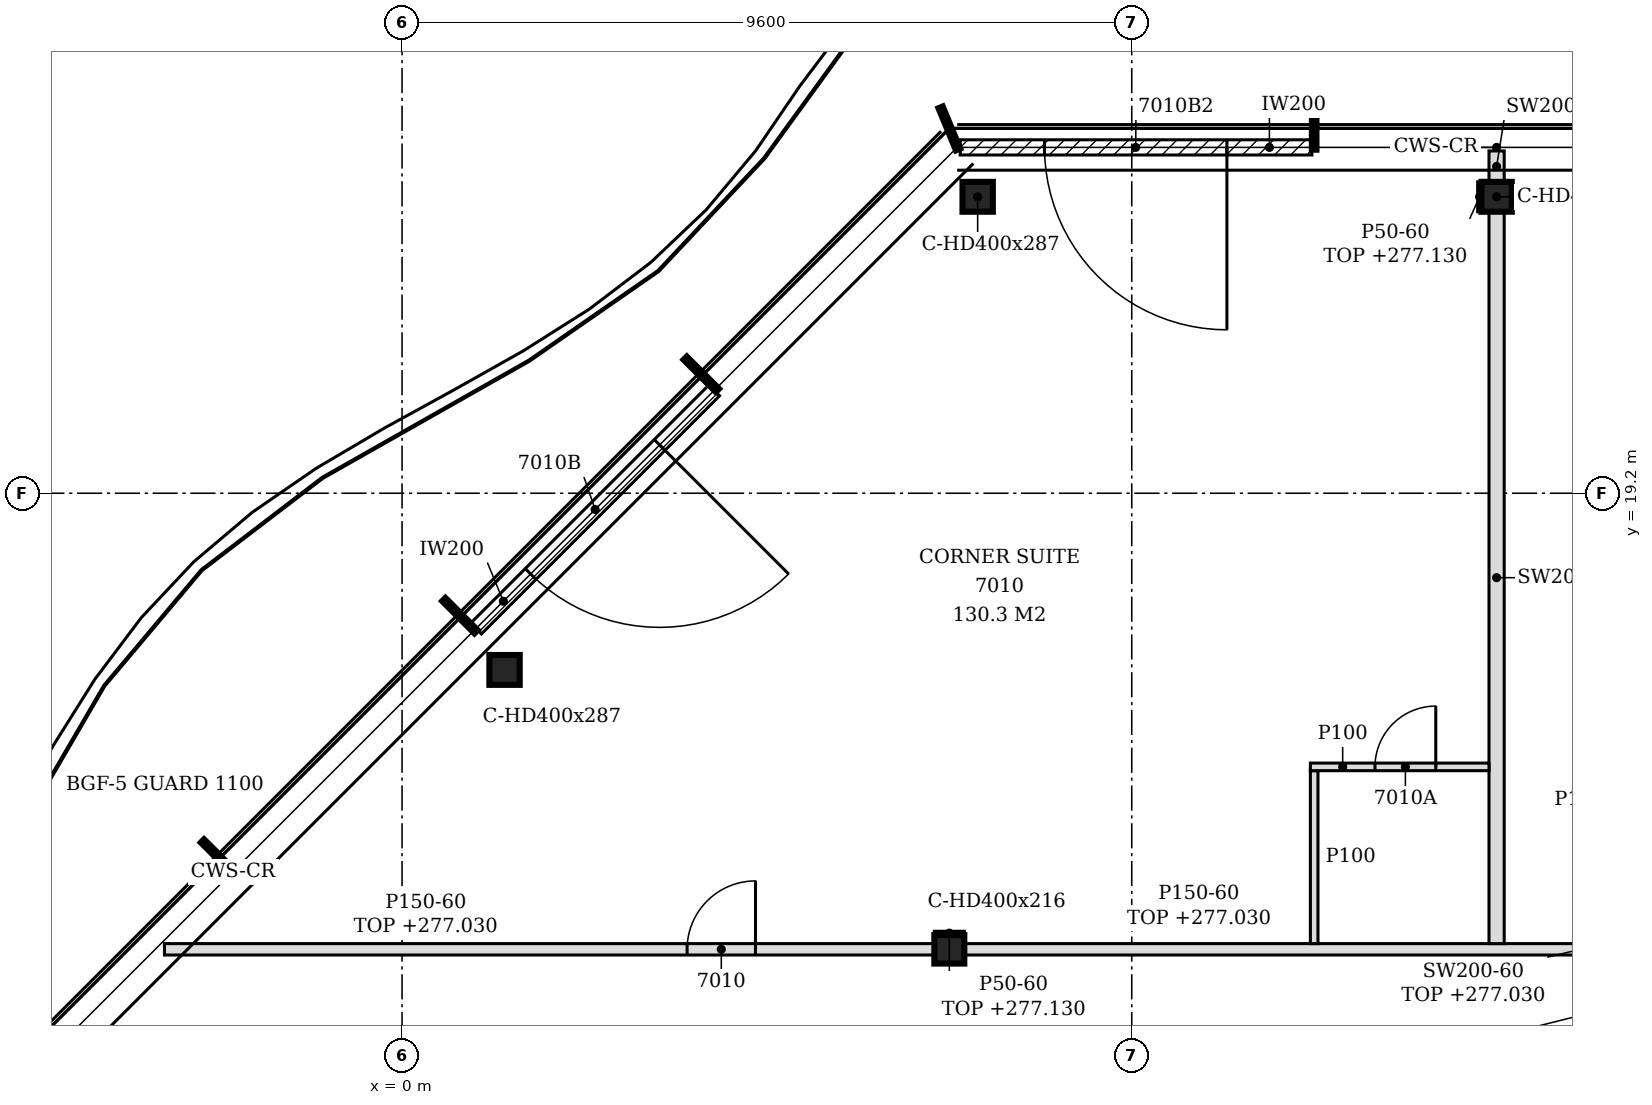
"""IFC4 building model, lengths in metres.
Left out: names, types, materials, properties, quantities, classifications, styles, units other than length and angle.
Written with IfcOpenShell. Run it as: python <this file> out.ifc"""

import sys

from ifc_helpers import new_model, si_unit, direction, frame, frame_2d, origin, origin_2d, place, context, subcontext, project, spatial, polyline, rectangle, i_section, outline, extrude, element, fill, save


model = new_model("IFC4")
c1 = context("Model", 3, precision=1e-05, world=origin(), true_north=direction((0.0, 1.0)))
c2 = subcontext(c1, "Body", "Model", "MODEL_VIEW")
j1 = project(units=[si_unit("LENGTHUNIT", "METRE"), si_unit("PLANEANGLEUNIT", "RADIAN")], contexts=[c1])
p1 = place(None, origin())
s1 = spatial("IfcSite", under=j1, at=p1, CompositionType="ELEMENT")
p2 = place(p1, origin())
s2 = spatial("IfcBuilding", under=s1, at=p2, CompositionType="ELEMENT")
p3 = place(p2, frame((0.0, 0.0, 274.2)))
s3 = spatial("IfcBuildingStorey", under=s2, at=p3, CompositionType="ELEMENT", Elevation=274.2)
for number, where, z_axis, x_axis in (
    (1, (14.4, 23.1, -0.15), (0.0, 0.0, 1.0), (1.0, 0.0, 0.0)),
    (2, (7.573, 23.1, -0.15), (0.0, 0.0, 1.0), (1.0, 0.0, 0.0)),
    (3, (1.348, 16.876, -0.15), (0.0, 0.0, 1.0), (1.0, 0.0, 0.0)),
):
    element("IfcColumn", number, at=place(p3, frame(where, z_axis=z_axis, x_axis=x_axis)), inside=s3, PredefinedType="COLUMN", context=c2, shape_type="SweptSolid", body=[
        extrude(i_section(OverallWidth=0.399, OverallDepth=0.393, WebThickness=0.023, FlangeThickness=0.037, FilletRadius=0.015, at=origin_2d()), origin(), (0.0, 0.0, 1.0), 3.6),
    ])
p4 = place(p3, frame((7.2, 13.2, -0.15), z_axis=(0.0, 0.0, 1.0), x_axis=(1.0, 0.0, 0.0)))
e4 = element("IfcColumn", 4, at=p4, inside=s3, PredefinedType="COLUMN", context=c2, shape_type="SweptSolid", body=[
    extrude(i_section(OverallWidth=0.394, OverallDepth=0.375, WebThickness=0.017, FlangeThickness=0.028, FilletRadius=0.015, at=origin_2d()), origin(), (0.0, 0.0, 1.0), 3.6),
])
p5 = place(p3, frame((11.97, 23.75, 0.0), z_axis=(0.0, 0.0, 1.0), x_axis=(-1.0, 0.0, 0.0)))
e5 = element("IfcWall", 5, at=p5, inside=s3, PredefinedType="NOTDEFINED", context=c2, shape_type="SweptSolid", body=[
    extrude(rectangle(XDim=4.626, YDim=0.2, at=frame_2d((2.313, 0.0))), origin(), (0.0, 0.0, 1.0), 3.45),
])
p6 = place(p5, frame((1.118, 0.0, 0.0)))
e6 = element("IfcOpeningElement", 6, at=p6, cuts=e5, PredefinedType="OPENING", context=c2, shape_type="SweptSolid", body=[
    extrude(rectangle(XDim=2.4, YDim=2.4, at=frame_2d((1.2, 1.2))), frame((0.0, 0.11, 0.0), z_axis=(0.0, -1.0, 0.0), x_axis=(1.0, 0.0, 0.0)), (0.0, 0.0, 1.0), 0.22),
])
p7 = place(p3, frame((4.107, 20.553, 0.0), z_axis=(0.0, 0.0, 1.0), x_axis=(-0.707079231393, -0.707134329907, 0.0)))
e7 = element("IfcWall", 7, at=p7, inside=s3, PredefinedType="NOTDEFINED", context=c2, shape_type="SweptSolid", body=[
    extrude(rectangle(XDim=4.431, YDim=0.2, at=frame_2d((2.215, 0.0))), origin(), (0.0, 0.0, 1.0), 3.45),
])
p8 = place(p7, frame((1.015, 0.0, 0.0)))
e8 = element("IfcOpeningElement", 8, at=p8, cuts=e7, PredefinedType="OPENING", context=c2, shape_type="SweptSolid", body=[
    extrude(rectangle(XDim=2.4, YDim=2.4, at=frame_2d((1.2, 1.2))), frame((0.0, 0.11, 0.0), z_axis=(0.0, -1.0, 0.0), x_axis=(1.0, 0.0, 0.0)), (0.0, 0.0, 1.0), 0.22),
])
p9 = place(p3, frame((-3.126, 13.2, 0.0), z_axis=(0.0, 0.0, 1.0), x_axis=(1.0, 0.0, 0.0)))
e9 = element("IfcWall", 9, at=p9, inside=s3, PredefinedType="PARTITIONING", context=c2, shape_type="SweptSolid", body=[
    extrude(outline(polyline([(0.0, 0.0), (10.129, 0.0), (10.129, 2.83), (1.369, 2.83), (1.367, 2.63), (0.229, 2.63), (0.227, 2.83), (0.0, 2.83), (0.0, 0.0)])), frame((0.0, 0.075, 0.0), z_axis=(0.0, -1.0, 0.0), x_axis=(1.0, 0.0, 0.0)), (0.0, 0.0, 1.0), 0.15),
])
p10 = place(p9, frame((6.876, 0.0, 0.0)))
e10 = element("IfcOpeningElement", 10, at=p10, cuts=e9, PredefinedType="OPENING", context=c2, shape_type="SweptSolid", body=[
    extrude(rectangle(XDim=0.9, YDim=2.1, at=frame_2d((0.45, 1.05))), frame((0.0, 0.085, 0.0), z_axis=(0.0, -1.0, 0.0), x_axis=(1.0, 0.0, 0.0)), (0.0, 0.0, 1.0), 0.17),
])
p11 = place(p3, frame((7.397, 13.2, 0.0), z_axis=(0.0, 0.0, 1.0), x_axis=(1.0, 0.0, 0.0)))
e11 = element("IfcWall", 11, at=p11, inside=s3, PredefinedType="PARTITIONING", context=c2, shape_type="SweptSolid", body=[
    extrude(rectangle(XDim=11.606, YDim=0.15, at=frame_2d((5.803, 0.0))), origin(), (0.0, 0.0, 1.0), 2.83),
])
p12 = place(p11, frame((8.129, 0.0, 0.0)))
e12 = element("IfcOpeningElement", 12, at=p12, cuts=e11, PredefinedType="OPENING", context=c2, shape_type="SweptSolid", body=[
    extrude(rectangle(XDim=0.9, YDim=2.1, at=frame_2d((0.45, 1.05))), frame((0.0, 0.085, 0.0), z_axis=(0.0, -1.0, 0.0), x_axis=(1.0, 0.0, 0.0)), (0.0, 0.0, 1.0), 0.17),
])
p13 = place(p3, frame((12.0, 13.275, 0.0), z_axis=(0.0, 0.0, 1.0), x_axis=(0.0, 1.0, 0.0)))
e13 = element("IfcWall", 13, at=p13, inside=s3, PredefinedType="PARTITIONING", context=c2, shape_type="SweptSolid", body=[
    extrude(outline(polyline([(0.0, 0.0), (2.275, 0.0), (2.275, 3.45), (0.075, 3.45), (0.073, 2.83), (0.0, 2.83), (0.0, 0.0)])), frame((0.0, 0.05, 0.0), z_axis=(0.0, -1.0, 0.0), x_axis=(1.0, 0.0, 0.0)), (0.0, 0.0, 1.0), 0.1),
])
p14 = place(p3, frame((14.4, 13.275, 0.0), z_axis=(0.0, 0.0, 1.0), x_axis=(0.0, 1.0, 0.0)))
e14 = element("IfcWall", 14, at=p14, inside=s3, PredefinedType="PARTITIONING", context=c2, shape_type="SweptSolid", body=[
    extrude(outline(polyline([(0.0, 0.0), (9.629, 0.0), (9.628, 3.45), (6.03, 3.45), (6.028, 2.88), (5.82, 2.88), (5.818, 3.45), (0.075, 3.45), (0.073, 2.83), (0.0, 2.83), (0.0, 0.0)])), frame((0.0, 0.1, 0.0), z_axis=(0.0, -1.0, 0.0), x_axis=(1.0, 0.0, 0.0)), (0.0, 0.0, 1.0), 0.2),
])
p15 = place(p3, frame((11.95, 15.6, 0.0), z_axis=(0.0, 0.0, 1.0), x_axis=(1.0, 0.0, 0.0)))
e15 = element("IfcWall", 15, at=p15, inside=s3, PredefinedType="PARTITIONING", context=c2, shape_type="SweptSolid", body=[
    extrude(rectangle(XDim=2.35, YDim=0.1, at=frame_2d((1.175, 0.0))), origin(), (0.0, 0.0, 1.0), 3.45),
])
p16 = place(p15, frame((0.85, 0.0, 0.0)))
e16 = element("IfcOpeningElement", 16, at=p16, cuts=e15, PredefinedType="OPENING", context=c2, shape_type="SweptSolid", body=[
    extrude(rectangle(XDim=0.8, YDim=2.1, at=frame_2d((0.4, 1.05))), frame((0.0, 0.06, 0.0), z_axis=(0.0, -1.0, 0.0), x_axis=(1.0, 0.0, 0.0)), (0.0, 0.0, 1.0), 0.12),
])
p17 = place(p3, frame((14.4, 23.296, 0.0), z_axis=(0.0, 0.0, 1.0), x_axis=(0.0, 1.0, 0.0)))
e17 = element("IfcWall", 17, at=p17, inside=s3, PredefinedType="PARTITIONING", context=c2, shape_type="SweptSolid", body=[
    extrude(rectangle(XDim=0.406, YDim=0.2, at=frame_2d((0.203, 0.0))), origin(), (0.0, 0.0, 1.0), 3.45),
])
p18 = place(p3, frame((7.003, 13.413, 0.0), z_axis=(0.0, 0.0, 1.0), x_axis=(1.0, 0.0, 0.0)))
e18 = element("IfcWall", 18, at=p18, inside=s3, PredefinedType="PARTITIONING", context=c2, shape_type="SweptSolid", body=[
    extrude(rectangle(XDim=0.394, YDim=0.05, at=frame_2d((0.197, 0.0))), origin(), (0.0, 0.0, 1.0), 2.93),
])
p19 = place(p3, frame((14.176, 22.904, 0.0), z_axis=(0.0, 0.0, 1.0), x_axis=(0.0, 1.0, 0.0)))
e19 = element("IfcWall", 19, at=p19, inside=s3, PredefinedType="PARTITIONING", context=c2, shape_type="SweptSolid", body=[
    extrude(rectangle(XDim=0.393, YDim=0.05, at=frame_2d((0.196, 0.0))), origin(), (0.0, 0.0, 1.0), 2.93),
])
p20 = place(p6, origin())
e20 = element("IfcDoor", 20, at=p20, inside=s3, OperationType="SINGLE_SWING_LEFT", PredefinedType="DOOR", context=c2, shape_type="SweptSolid", body=[
    extrude(rectangle(XDim=2.4, YDim=2.4, at=frame_2d((1.2, 1.2))), frame((0.0, 0.025, 0.0), z_axis=(0.0, -1.0, 0.0), x_axis=(1.0, 0.0, 0.0)), (0.0, 0.0, 1.0), 0.05),
])
fill(e6, e20)
p21 = place(p8, origin())
e21 = element("IfcDoor", 21, at=p21, inside=s3, OperationType="SINGLE_SWING_LEFT", PredefinedType="DOOR", context=c2, shape_type="SweptSolid", body=[
    extrude(rectangle(XDim=2.4, YDim=2.4, at=frame_2d((1.2, 1.2))), frame((0.0, 0.025, 0.0), z_axis=(0.0, -1.0, 0.0), x_axis=(1.0, 0.0, 0.0)), (0.0, 0.0, 1.0), 0.05),
])
fill(e8, e21)
p22 = place(p10, origin())
e22 = element("IfcDoor", 22, at=p22, inside=s3, OperationType="SINGLE_SWING_RIGHT", PredefinedType="DOOR", context=c2, shape_type="SweptSolid", body=[
    extrude(rectangle(XDim=0.9, YDim=2.1, at=frame_2d((0.45, 1.05))), frame((0.0, 0.025, 0.0), z_axis=(0.0, -1.0, 0.0), x_axis=(1.0, 0.0, 0.0)), (0.0, 0.0, 1.0), 0.05),
])
fill(e10, e22)
p23 = place(p16, origin())
e23 = element("IfcDoor", 23, at=p23, inside=s3, OperationType="SINGLE_SWING_RIGHT", PredefinedType="DOOR", context=c2, shape_type="SweptSolid", body=[
    extrude(rectangle(XDim=0.8, YDim=2.1, at=frame_2d((0.4, 1.05))), frame((0.0, 0.025, 0.0), z_axis=(0.0, -1.0, 0.0), x_axis=(1.0, 0.0, 0.0)), (0.0, 0.0, 1.0), 0.05),
])
fill(e16, e23)
save(model, sys.argv[1])
